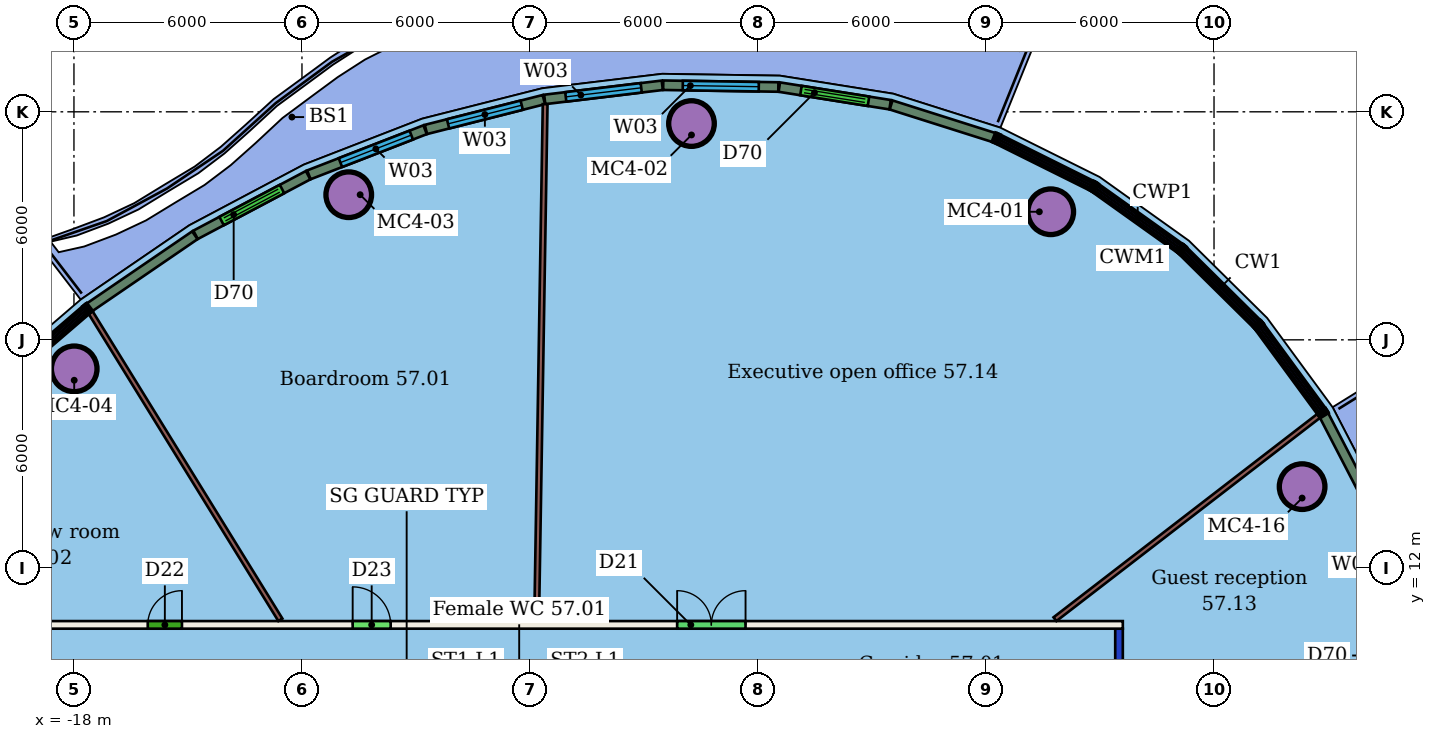
"""IFC4 building model, lengths in metres.
Left out: names, types, materials, properties, quantities, classifications, styles, units other than length and angle.
Written with IfcOpenShell. Run it as: python <this file> out.ifc"""

import sys

from ifc_helpers import new_model, si_unit, direction, frame, frame_2d, origin, origin_2d, place, context, subcontext, project, spatial, rectangle, hollow_circle, extrude, element, fill, save


model = new_model("IFC4")
c1 = context("Model", 3, precision=1e-05, world=origin(), true_north=direction((0.0, 1.0)))
c2 = subcontext(c1, "Body", "Model", "MODEL_VIEW")
j1 = project(units=[si_unit("LENGTHUNIT", "METRE"), si_unit("PLANEANGLEUNIT", "RADIAN")], contexts=[c1])
p1 = place(None, origin())
s1 = spatial("IfcSite", under=j1, at=p1, CompositionType="ELEMENT")
p2 = place(p1, origin())
s2 = spatial("IfcBuilding", under=s1, at=p2, CompositionType="ELEMENT")
p3 = place(p2, frame((0.0, 0.0, 231.7)))
s3 = spatial("IfcBuildingStorey", under=s2, at=p3, CompositionType="ELEMENT", Elevation=231.7)
for number, where, z_axis, x_axis in (
    (1, (7.704, 21.37, 0.0), (0.0, 0.0, 1.0), (1.0, 0.0, 0.0)),
    (2, (-1.75, 23.691, 0.0), (0.0, 0.0, 1.0), (1.0, 0.0, 0.0)),
    (3, (-10.769, 21.819, 0.0), (0.0, 0.0, 1.0), (1.0, 0.0, 0.0)),
    (4, (-17.993, 17.237, 0.0), (0.0, 0.0, 1.0), (1.0, 0.0, 0.0)),
    (5, (14.318, 14.137, 0.0), (0.0, 0.0, 1.0), (1.0, 0.0, 0.0)),
):
    element("IfcColumn", number, at=place(p3, frame(where, z_axis=z_axis, x_axis=x_axis)), inside=s3, PredefinedType="COLUMN", context=c2, shape_type="SweptSolid", body=[
        extrude(hollow_circle(Radius=0.6, WallThickness=0.045, at=origin_2d()), origin(), (0.0, 0.0, 1.0), 3.45),
    ])
p4 = place(p3, frame((-21.6, 10.5, 0.0), z_axis=(0.0, 0.0, 1.0), x_axis=(1.0, 0.0, 0.0)))
e6 = element("IfcWall", 6, at=p4, inside=s3, PredefinedType="PARTITIONING", context=c2, shape_type="SweptSolid", body=[
    extrude(rectangle(XDim=31.2, YDim=0.2, at=frame_2d((15.6, 0.0))), origin(), (0.0, 0.0, 1.0), 3.45),
])
p5 = place(p4, frame((10.934, 0.0, 0.0)))
e7 = element("IfcOpeningElement", 7, at=p5, cuts=e6, PredefinedType="OPENING", context=c2, shape_type="SweptSolid", body=[
    extrude(rectangle(XDim=1.0, YDim=2.4, at=frame_2d((0.5, 1.2))), frame((0.0, 0.11, 0.0), z_axis=(0.0, -1.0, 0.0), x_axis=(1.0, 0.0, 0.0)), (0.0, 0.0, 1.0), 0.22),
])
p6 = place(p4, frame((5.542, 0.0, 0.0)))
e8 = element("IfcOpeningElement", 8, at=p6, cuts=e6, PredefinedType="OPENING", context=c2, shape_type="SweptSolid", body=[
    extrude(rectangle(XDim=0.9, YDim=2.1, at=frame_2d((0.45, 1.05))), frame((0.0, 0.11, 0.0), z_axis=(0.0, -1.0, 0.0), x_axis=(1.0, 0.0, 0.0)), (0.0, 0.0, 1.0), 0.22),
])
p7 = place(p4, frame((19.472, 0.0, 0.0)))
e9 = element("IfcOpeningElement", 9, at=p7, cuts=e6, PredefinedType="OPENING", context=c2, shape_type="SweptSolid", body=[
    extrude(rectangle(XDim=1.8, YDim=2.1, at=frame_2d((0.9, 1.05))), frame((0.0, 0.11, 0.0), z_axis=(0.0, -1.0, 0.0), x_axis=(1.0, 0.0, 0.0)), (0.0, 0.0, 1.0), 0.22),
])
p8 = place(p3, frame((9.5, 10.4, 0.0), z_axis=(0.0, 0.0, 1.0), x_axis=(0.0, -1.0, 0.0)))
e10 = element("IfcWall", 10, at=p8, inside=s3, PredefinedType="PARTITIONING", context=c2, shape_type="SweptSolid", body=[
    extrude(rectangle(XDim=20.8, YDim=0.2, at=frame_2d((10.4, 0.0))), origin(), (0.0, 0.0, 1.0), 3.05),
])
p9 = place(p8, frame((15.989, 0.0, 0.0)))
e11 = element("IfcOpeningElement", 11, at=p9, cuts=e10, PredefinedType="OPENING", context=c2, shape_type="SweptSolid", body=[
    extrude(rectangle(XDim=1.0, YDim=2.4, at=frame_2d((0.5, 1.2))), frame((0.0, 0.11, 0.0), z_axis=(0.0, -1.0, 0.0), x_axis=(1.0, 0.0, 0.0)), (0.0, 0.0, 1.0), 0.22),
])
p10 = place(p8, frame((11.814, 0.0, 0.0)))
e12 = element("IfcOpeningElement", 12, at=p10, cuts=e10, PredefinedType="OPENING", context=c2, shape_type="SweptSolid", body=[
    extrude(rectangle(XDim=1.0, YDim=2.4, at=frame_2d((0.5, 1.2))), frame((0.0, 0.11, 0.0), z_axis=(0.0, -1.0, 0.0), x_axis=(1.0, 0.0, 0.0)), (0.0, 0.0, 1.0), 0.22),
])
p11 = place(p8, frame((6.499, 0.0, 0.0)))
e13 = element("IfcOpeningElement", 13, at=p11, cuts=e10, PredefinedType="OPENING", context=c2, shape_type="SweptSolid", body=[
    extrude(rectangle(XDim=0.9, YDim=2.1, at=frame_2d((0.45, 1.05))), frame((0.0, 0.11, 0.0), z_axis=(0.0, -1.0, 0.0), x_axis=(1.0, 0.0, 0.0)), (0.0, 0.0, 1.0), 0.22),
])
p12 = place(p8, frame((2.673, 0.0, 0.0)))
e14 = element("IfcOpeningElement", 14, at=p12, cuts=e10, PredefinedType="OPENING", context=c2, shape_type="SweptSolid", body=[
    extrude(rectangle(XDim=1.2, YDim=2.4, at=frame_2d((0.6, 1.2))), frame((0.0, 0.11, 0.0), z_axis=(0.0, -1.0, 0.0), x_axis=(1.0, 0.0, 0.0)), (0.0, 0.0, 1.0), 0.22),
])
p13 = place(p3, frame((-5.601, 24.202, 0.0), z_axis=(0.0, 0.0, 1.0), x_axis=(-0.016494488694, -0.999863956667, 0.0)))
e15 = element("IfcWall", 15, at=p13, inside=s3, PredefinedType="PARTITIONING", context=c2, shape_type="SweptSolid", body=[
    extrude(rectangle(XDim=13.603, YDim=0.125, at=frame_2d((6.801, 0.0))), origin(), (0.0, 0.0, 1.0), 3.45),
])
p14 = place(p3, frame((-17.564, 18.722, 0.0), z_axis=(0.0, 0.0, 1.0), x_axis=(0.52550928058, -0.850787867817, 0.0)))
e16 = element("IfcWall", 16, at=p14, inside=s3, PredefinedType="PARTITIONING", context=c2, shape_type="SweptSolid", body=[
    extrude(rectangle(XDim=9.508, YDim=0.125, at=frame_2d((4.754, 0.0))), origin(), (0.0, 0.0, 1.0), 3.45),
])
p15 = place(p3, frame((14.759, 16.003, 0.0), z_axis=(0.0, 0.0, 1.0), x_axis=(-0.791981870626, -0.61054460656, 0.0)))
e17 = element("IfcWall", 17, at=p15, inside=s3, PredefinedType="PARTITIONING", context=c2, shape_type="SweptSolid", body=[
    extrude(rectangle(XDim=8.769, YDim=0.125, at=frame_2d((4.385, 0.0))), origin(), (0.0, 0.0, 1.0), 3.45),
])
p16 = place(p3, frame((6.215, 23.321, 0.0), z_axis=(0.0, 0.0, 1.0), x_axis=(-0.953313818487, 0.301981395918, 0.0)))
e18 = element("IfcWall", 18, at=p16, inside=s3, PredefinedType="SOLIDWALL", context=c2, shape_type="SweptSolid", body=[
    extrude(rectangle(XDim=2.845, YDim=0.25, at=frame_2d((1.422, 0.0))), origin(), (0.0, 0.0, 1.0), 3.1),
])
p17 = place(p3, frame((3.477, 24.187, 0.0), z_axis=(0.0, 0.0, 1.0), x_axis=(-0.987576514549, 0.157138880968, 0.0)))
e19 = element("IfcWall", 19, at=p17, inside=s3, PredefinedType="SOLIDWALL", context=c2, shape_type="SweptSolid", body=[
    extrude(rectangle(XDim=2.952, YDim=0.25, at=frame_2d((1.476, 0.0))), origin(), (0.0, 0.0, 1.0), 3.1),
])
p18 = place(p17, frame((0.576, 0.0, 0.0)))
e20 = element("IfcOpeningElement", 20, at=p18, cuts=e19, PredefinedType="OPENING", context=c2, shape_type="SweptSolid", body=[
    extrude(rectangle(XDim=1.8, YDim=2.4, at=frame_2d((0.9, 1.2))), frame((0.0, 0.135, 0.0), z_axis=(0.0, -1.0, 0.0), x_axis=(1.0, 0.0, 0.0)), (0.0, 0.0, 1.0), 0.27),
])
p19 = place(p3, frame((0.536, 24.653, 0.0), z_axis=(0.0, 0.0, 1.0), x_axis=(-0.999880339465, 0.015469542722, 0.0)))
e21 = element("IfcWall", 21, at=p19, inside=s3, PredefinedType="SOLIDWALL", context=c2, shape_type="SweptSolid", body=[
    extrude(rectangle(XDim=3.03, YDim=0.25, at=frame_2d((1.515, 0.0))), origin(), (0.0, 0.0, 1.0), 3.1),
])
p20 = place(p19, frame((0.515, 0.0, 0.9)))
e22 = element("IfcOpeningElement", 22, at=p20, cuts=e21, PredefinedType="OPENING", context=c2, shape_type="SweptSolid", body=[
    extrude(rectangle(XDim=2.0, YDim=2.1, at=frame_2d((1.0, 1.05))), frame((0.0, 0.135, 0.0), z_axis=(0.0, -1.0, 0.0), x_axis=(1.0, 0.0, 0.0)), (0.0, 0.0, 1.0), 0.27),
])
p21 = place(p3, frame((-2.519, 24.698, 0.0), z_axis=(0.0, 0.0, 1.0), x_axis=(-0.992831895077, -0.119519153773, 0.0)))
e23 = element("IfcWall", 23, at=p21, inside=s3, PredefinedType="SOLIDWALL", context=c2, shape_type="SweptSolid", body=[
    extrude(rectangle(XDim=3.115, YDim=0.25, at=frame_2d((1.558, 0.0))), origin(), (0.0, 0.0, 1.0), 3.1),
])
p22 = place(p21, frame((0.558, 0.0, 0.9)))
e24 = element("IfcOpeningElement", 24, at=p22, cuts=e23, PredefinedType="OPENING", context=c2, shape_type="SweptSolid", body=[
    extrude(rectangle(XDim=2.0, YDim=2.1, at=frame_2d((1.0, 1.05))), frame((0.0, 0.135, 0.0), z_axis=(0.0, -1.0, 0.0), x_axis=(1.0, 0.0, 0.0)), (0.0, 0.0, 1.0), 0.27),
])
p23 = place(p3, frame((-5.635, 24.322, 0.0), z_axis=(0.0, 0.0, 1.0), x_axis=(-0.969361212149, -0.245639655554, 0.0)))
e25 = element("IfcWall", 25, at=p23, inside=s3, PredefinedType="SOLIDWALL", context=c2, shape_type="SweptSolid", body=[
    extrude(rectangle(XDim=3.2, YDim=0.25, at=frame_2d((1.6, 0.0))), origin(), (0.0, 0.0, 1.0), 3.1),
])
p24 = place(p23, frame((0.6, 0.0, 0.9)))
e26 = element("IfcOpeningElement", 26, at=p24, cuts=e25, PredefinedType="OPENING", context=c2, shape_type="SweptSolid", body=[
    extrude(rectangle(XDim=2.0, YDim=2.1, at=frame_2d((1.0, 1.05))), frame((0.0, 0.135, 0.0), z_axis=(0.0, -1.0, 0.0), x_axis=(1.0, 0.0, 0.0)), (0.0, 0.0, 1.0), 0.27),
])
p25 = place(p3, frame((-8.76, 23.528, 0.0), z_axis=(0.0, 0.0, 1.0), x_axis=(-0.932220972819, -0.361889565803, 0.0)))
e27 = element("IfcWall", 27, at=p25, inside=s3, PredefinedType="SOLIDWALL", context=c2, shape_type="SweptSolid", body=[
    extrude(rectangle(XDim=3.281, YDim=0.25, at=frame_2d((1.64, 0.0))), origin(), (0.0, 0.0, 1.0), 3.1),
])
p26 = place(p25, frame((0.39, 0.0, 0.9)))
e28 = element("IfcOpeningElement", 28, at=p26, cuts=e27, PredefinedType="OPENING", context=c2, shape_type="SweptSolid", body=[
    extrude(rectangle(XDim=2.0, YDim=2.1, at=frame_2d((1.0, 1.05))), frame((0.0, 0.135, 0.0), z_axis=(0.0, -1.0, 0.0), x_axis=(1.0, 0.0, 0.0)), (0.0, 0.0, 1.0), 0.27),
])
p27 = place(p3, frame((-11.839, 22.332, 0.0), z_axis=(0.0, 0.0, 1.0), x_axis=(-0.883644332984, -0.46815883286, 0.0)))
e29 = element("IfcWall", 29, at=p27, inside=s3, PredefinedType="SOLIDWALL", context=c2, shape_type="SweptSolid", body=[
    extrude(rectangle(XDim=3.351, YDim=0.25, at=frame_2d((1.676, 0.0))), origin(), (0.0, 0.0, 1.0), 3.1),
])
p28 = place(p27, frame((0.776, 0.0, 0.0)))
e30 = element("IfcOpeningElement", 30, at=p28, cuts=e29, PredefinedType="OPENING", context=c2, shape_type="SweptSolid", body=[
    extrude(rectangle(XDim=1.8, YDim=2.4, at=frame_2d((0.9, 1.2))), frame((0.0, 0.135, 0.0), z_axis=(0.0, -1.0, 0.0), x_axis=(1.0, 0.0, 0.0)), (0.0, 0.0, 1.0), 0.27),
])
p29 = place(p3, frame((-14.819, 20.751, 0.0), z_axis=(0.0, 0.0, 1.0), x_axis=(-0.82535711283, -0.564611048689, 0.0)))
e31 = element("IfcWall", 31, at=p29, inside=s3, PredefinedType="SOLIDWALL", context=c2, shape_type="SweptSolid", body=[
    extrude(rectangle(XDim=3.363, YDim=0.25, at=frame_2d((1.682, 0.0))), origin(), (0.0, 0.0, 1.0), 3.1),
])
p30 = place(p3, frame((16.201, 13.495, 0.0), z_axis=(0.0, 0.0, 1.0), x_axis=(-0.460447402604, 0.887686988434, 0.0)))
e32 = element("IfcWall", 32, at=p30, inside=s3, PredefinedType="SOLIDWALL", context=c2, shape_type="SweptSolid", body=[
    extrude(rectangle(XDim=2.845, YDim=0.25, at=frame_2d((1.423, 0.0))), origin(), (0.0, 0.0, 1.0), 3.1),
])
p31 = place(p5, origin())
e33 = element("IfcDoor", 33, at=p31, inside=s3, OperationType="SINGLE_SWING_LEFT", PredefinedType="DOOR", context=c2, shape_type="SweptSolid", body=[
    extrude(rectangle(XDim=1.0, YDim=2.4, at=frame_2d((0.5, 1.2))), frame((0.0, 0.025, 0.0), z_axis=(0.0, -1.0, 0.0), x_axis=(1.0, 0.0, 0.0)), (0.0, 0.0, 1.0), 0.05),
])
fill(e7, e33)
p32 = place(p6, origin())
e34 = element("IfcDoor", 34, at=p32, inside=s3, OperationType="SINGLE_SWING_RIGHT", PredefinedType="DOOR", context=c2, shape_type="SweptSolid", body=[
    extrude(rectangle(XDim=0.9, YDim=2.1, at=frame_2d((0.45, 1.05))), frame((0.0, 0.025, 0.0), z_axis=(0.0, -1.0, 0.0), x_axis=(1.0, 0.0, 0.0)), (0.0, 0.0, 1.0), 0.05),
])
fill(e8, e34)
p33 = place(p7, origin())
e35 = element("IfcDoor", 35, at=p33, inside=s3, OperationType="DOUBLE_DOOR_SINGLE_SWING", PredefinedType="DOOR", context=c2, shape_type="SweptSolid", body=[
    extrude(rectangle(XDim=1.8, YDim=2.1, at=frame_2d((0.9, 1.05))), frame((0.0, 0.025, 0.0), z_axis=(0.0, -1.0, 0.0), x_axis=(1.0, 0.0, 0.0)), (0.0, 0.0, 1.0), 0.05),
])
fill(e9, e35)
p34 = place(p18, origin())
e36 = element("IfcDoor", 36, at=p34, inside=s3, OperationType="DOUBLE_DOOR_SLIDING", PredefinedType="DOOR", context=c2, shape_type="SweptSolid", body=[
    extrude(rectangle(XDim=1.8, YDim=2.4, at=frame_2d((0.9, 1.2))), frame((0.0, 0.025, 0.0), z_axis=(0.0, -1.0, 0.0), x_axis=(1.0, 0.0, 0.0)), (0.0, 0.0, 1.0), 0.05),
])
fill(e20, e36)
p35 = place(p20, origin())
e37 = element("IfcWindow", 37, at=p35, inside=s3, PartitioningType="SINGLE_PANEL", PredefinedType="WINDOW", context=c2, shape_type="SweptSolid", body=[
    extrude(rectangle(XDim=2.0, YDim=2.1, at=frame_2d((1.0, 1.05))), frame((0.0, 0.03, 0.0), z_axis=(0.0, -1.0, 0.0), x_axis=(1.0, 0.0, 0.0)), (0.0, 0.0, 1.0), 0.06),
])
fill(e22, e37)
p36 = place(p22, origin())
e38 = element("IfcWindow", 38, at=p36, inside=s3, PartitioningType="SINGLE_PANEL", PredefinedType="WINDOW", context=c2, shape_type="SweptSolid", body=[
    extrude(rectangle(XDim=2.0, YDim=2.1, at=frame_2d((1.0, 1.05))), frame((0.0, 0.03, 0.0), z_axis=(0.0, -1.0, 0.0), x_axis=(1.0, 0.0, 0.0)), (0.0, 0.0, 1.0), 0.06),
])
fill(e24, e38)
p37 = place(p24, origin())
e39 = element("IfcWindow", 39, at=p37, inside=s3, PartitioningType="SINGLE_PANEL", PredefinedType="WINDOW", context=c2, shape_type="SweptSolid", body=[
    extrude(rectangle(XDim=2.0, YDim=2.1, at=frame_2d((1.0, 1.05))), frame((0.0, 0.03, 0.0), z_axis=(0.0, -1.0, 0.0), x_axis=(1.0, 0.0, 0.0)), (0.0, 0.0, 1.0), 0.06),
])
fill(e26, e39)
p38 = place(p26, origin())
e40 = element("IfcWindow", 40, at=p38, inside=s3, PartitioningType="SINGLE_PANEL", PredefinedType="WINDOW", context=c2, shape_type="SweptSolid", body=[
    extrude(rectangle(XDim=2.0, YDim=2.1, at=frame_2d((1.0, 1.05))), frame((0.0, 0.03, 0.0), z_axis=(0.0, -1.0, 0.0), x_axis=(1.0, 0.0, 0.0)), (0.0, 0.0, 1.0), 0.06),
])
fill(e28, e40)
p39 = place(p28, origin())
e41 = element("IfcDoor", 41, at=p39, inside=s3, OperationType="DOUBLE_DOOR_SLIDING", PredefinedType="DOOR", context=c2, shape_type="SweptSolid", body=[
    extrude(rectangle(XDim=1.8, YDim=2.4, at=frame_2d((0.9, 1.2))), frame((0.0, 0.025, 0.0), z_axis=(0.0, -1.0, 0.0), x_axis=(1.0, 0.0, 0.0)), (0.0, 0.0, 1.0), 0.05),
])
fill(e30, e41)
save(model, sys.argv[1])
